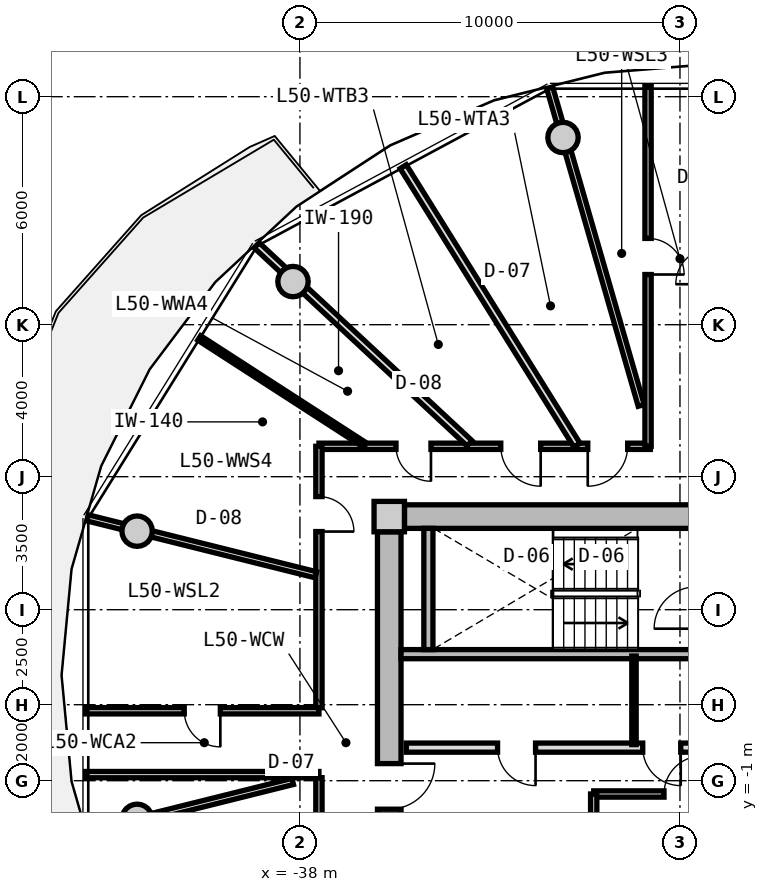
"""IFC4 building model, lengths in metres.
Left out: names, types, materials, properties, quantities, classifications, styles, units other than length and angle.
Written with IfcOpenShell. Run it as: python <this file> out.ifc"""

import sys

from ifc_helpers import new_model, si_unit, direction, frame, frame_2d, origin, origin_2d, place, context, subcontext, project, spatial, rectangle, circle, extrude, source, transform, mapped, element, fill, save


model = new_model("IFC4")
c1 = context("Model", 3, precision=1e-05, world=origin(), true_north=direction((0.0, 1.0)))
c2 = subcontext(c1, "Body", "Model", "MODEL_VIEW")
j1 = project(units=[si_unit("LENGTHUNIT", "METRE"), si_unit("PLANEANGLEUNIT", "RADIAN")], contexts=[c1])
p1 = place(None, origin())
s1 = spatial("IfcSite", under=j1, at=p1, CompositionType="ELEMENT")
p2 = place(p1, origin())
s2 = spatial("IfcBuilding", under=s1, at=p2, CompositionType="ELEMENT")
p3 = place(p2, frame((0.0, 0.0, 161.75)))
s3 = spatial("IfcBuildingStorey", under=s2, at=p3, CompositionType="ELEMENT", Elevation=161.75)
m1 = source(origin(), c2, "Body", "SweptSolid", [
    extrude(rectangle(XDim=0.8, YDim=0.8, at=origin_2d()), origin(), (0.0, 0.0, 1.0), 3.05),
])
p4 = place(p3, frame((-35.65, 5.95, 0.0), z_axis=(0.0, 0.0, 1.0), x_axis=(1.0, 0.0, 0.0)))
e1 = element("IfcColumn", 1, at=p4, inside=s3, PredefinedType="COLUMN", context=c2, shape_type="MappedRepresentation", body=[
    mapped(m1, transform((0.0, 0.0, 0.0), x_axis=(1.0, 0.0, 0.0), y_axis=(0.0, 1.0, 0.0), z_axis=(0.0, 0.0, 1.0), scale=1.0)),
])
m2 = source(origin(), c2, "Body", "SweptSolid", [
    extrude(rectangle(XDim=14.5, YDim=0.62, at=frame_2d((7.25, 0.0))), origin(), (0.0, 0.0, 1.0), 2.81),
])
p5 = place(p3, frame((-35.25, 5.95, 0.0), z_axis=(0.0, 0.0, 1.0), x_axis=(1.0, 0.0, 0.0)))
e2 = element("IfcWall", 2, at=p5, inside=s3, PredefinedType="SHEAR", context=c2, shape_type="MappedRepresentation", body=[
    mapped(m2, transform((0.0, 0.0, 0.0), x_axis=(1.0, 0.0, 0.0), y_axis=(0.0, 1.0, 0.0), z_axis=(0.0, 0.0, 1.0), scale=1.0)),
])
m3 = source(origin(), c2, "Body", "SweptSolid", [
    extrude(rectangle(XDim=11.1, YDim=0.62, at=frame_2d((5.55, 0.0))), origin(), (0.0, 0.0, 1.0), 2.81),
])
p6 = place(p3, frame((-35.65, -5.55, 0.0), z_axis=(0.0, 0.0, 1.0), x_axis=(0.0, 1.0, 0.0)))
e3 = element("IfcWall", 3, at=p6, inside=s3, PredefinedType="SHEAR", context=c2, shape_type="MappedRepresentation", body=[
    mapped(m3, transform((0.0, 0.0, 0.0), x_axis=(1.0, 0.0, 0.0), y_axis=(0.0, 1.0, 0.0), z_axis=(0.0, 0.0, 1.0), scale=1.0)),
])
p7 = place(p6, frame((3.8, 0.0, 0.0)))
e4 = element("IfcOpeningElement", 4, at=p7, cuts=e3, PredefinedType="OPENING", context=c2, shape_type="SweptSolid", body=[
    extrude(rectangle(XDim=1.2, YDim=2.15, at=frame_2d((0.6, 1.075))), frame((0.0, 0.32, 0.0), z_axis=(0.0, -1.0, 0.0), x_axis=(1.0, 0.0, 0.0)), (0.0, 0.0, 1.0), 0.64),
])
m4 = source(origin(), c2, "Body", "SweptSolid", [
    extrude(circle(Radius=0.4, at=origin_2d()), origin(), (0.0, 0.0, 1.0), 3.05),
])
for number, where, z_axis, x_axis in (
    (5, (-31.077, 15.926, 0.0), (0.0, 0.0, 1.0), (1.0, 0.0, 0.0)),
    (6, (-38.183, 12.135, 0.0), (0.0, 0.0, 1.0), (1.0, 0.0, 0.0)),
    (7, (-42.285, 5.567, 0.0), (0.0, 0.0, 1.0), (1.0, 0.0, 0.0)),
    (8, (-42.285, -2.016, 0.0), (0.0, 0.0, 1.0), (1.0, 0.0, 0.0)),
):
    element("IfcColumn", number, at=place(p3, frame(where, z_axis=z_axis, x_axis=x_axis)), inside=s3, PredefinedType="COLUMN", context=c2, shape_type="MappedRepresentation", body=[
        mapped(m4, transform((0.0, 0.0, 0.0), x_axis=(1.0, 0.0, 0.0), y_axis=(0.0, 1.0, 0.0), z_axis=(0.0, 0.0, 1.0), scale=1.0)),
    ])
m5 = source(origin(), c2, "Body", "SweptSolid", [
    extrude(rectangle(XDim=7.88, YDim=0.24, at=frame_2d((3.94, 0.0))), origin(), (0.0, 0.0, 1.0), 2.81),
])
p8 = place(p3, frame((-35.34, 2.33, 0.0), z_axis=(0.0, 0.0, 1.0), x_axis=(1.0, 0.0, 0.0)))
e9 = element("IfcWall", 9, at=p8, inside=s3, PredefinedType="PARTITIONING", context=c2, shape_type="MappedRepresentation", body=[
    mapped(m5, transform((0.0, 0.0, 0.0), x_axis=(1.0, 0.0, 0.0), y_axis=(0.0, 1.0, 0.0), z_axis=(0.0, 0.0, 1.0), scale=1.0)),
])
m6 = source(origin(), c2, "Body", "SweptSolid", [
    extrude(rectangle(XDim=3.19, YDim=0.24, at=frame_2d((1.595, 0.0))), origin(), (0.0, 0.0, 1.0), 2.81),
])
p9 = place(p3, frame((-34.62, 2.45, 0.0), z_axis=(0.0, 0.0, 1.0), x_axis=(0.0, 1.0, 0.0)))
e10 = element("IfcWall", 10, at=p9, inside=s3, PredefinedType="PARTITIONING", context=c2, shape_type="MappedRepresentation", body=[
    mapped(m6, transform((0.0, 0.0, 0.0), x_axis=(1.0, 0.0, 0.0), y_axis=(0.0, 1.0, 0.0), z_axis=(0.0, 0.0, 1.0), scale=1.0)),
])
m7 = source(origin(), c2, "Body", "SweptSolid", [
    extrude(rectangle(XDim=7.62, YDim=0.24, at=frame_2d((3.81, 0.0))), origin(), (0.0, 0.0, 1.0), 2.795),
])
p10 = place(p3, frame((-35.2, -0.13, 0.0), z_axis=(0.0, 0.0, 1.0), x_axis=(1.0, 0.0, 0.0)))
e11 = element("IfcWall", 11, at=p10, inside=s3, PredefinedType="PARTITIONING", context=c2, shape_type="MappedRepresentation", body=[
    mapped(m7, transform((0.0, 0.0, 0.0), x_axis=(1.0, 0.0, 0.0), y_axis=(0.0, 1.0, 0.0), z_axis=(0.0, 0.0, 1.0), scale=1.0)),
])
p11 = place(p10, frame((6.22, 0.0, 0.0)))
e12 = element("IfcOpeningElement", 12, at=p11, cuts=e11, PredefinedType="OPENING", context=c2, shape_type="SweptSolid", body=[
    extrude(rectangle(XDim=1.0, YDim=2.1, at=frame_2d((0.5, 1.05))), frame((0.0, 0.13, 0.0), z_axis=(0.0, -1.0, 0.0), x_axis=(1.0, 0.0, 0.0)), (0.0, 0.0, 1.0), 0.26),
])
p12 = place(p10, frame((2.4, 0.0, 0.0)))
e13 = element("IfcOpeningElement", 13, at=p12, cuts=e11, PredefinedType="OPENING", context=c2, shape_type="SweptSolid", body=[
    extrude(rectangle(XDim=1.0, YDim=2.1, at=frame_2d((0.5, 1.05))), frame((0.0, 0.13, 0.0), z_axis=(0.0, -1.0, 0.0), x_axis=(1.0, 0.0, 0.0)), (0.0, 0.0, 1.0), 0.26),
])
m8 = source(origin(), c2, "Body", "SweptSolid", [
    extrude(rectangle(XDim=2.33, YDim=0.115, at=frame_2d((1.165, 0.0))), origin(), (0.0, 0.0, 1.0), 2.795),
])
p13 = place(p3, frame((-29.21, -0.05, 0.0), z_axis=(0.0, 0.0, 1.0), x_axis=(0.0, 1.0, 0.0)))
e14 = element("IfcWall", 14, at=p13, inside=s3, PredefinedType="PARTITIONING", context=c2, shape_type="MappedRepresentation", body=[
    mapped(m8, transform((0.0, 0.0, 0.0), x_axis=(1.0, 0.0, 0.0), y_axis=(0.0, 1.0, 0.0), z_axis=(0.0, 0.0, 1.0), scale=1.0)),
])
m9 = source(origin(), c2, "Body", "SweptSolid", [
    extrude(rectangle(XDim=4.77, YDim=0.165, at=frame_2d((2.385, 0.0))), origin(), (0.0, 0.0, 1.0), 2.795),
])
p14 = place(p3, frame((-30.27, -1.35, 0.0), z_axis=(0.0, 0.0, 1.0), x_axis=(1.0, 0.0, 0.0)))
e15 = element("IfcWall", 15, at=p14, inside=s3, PredefinedType="PARTITIONING", context=c2, shape_type="MappedRepresentation", body=[
    mapped(m9, transform((0.0, 0.0, 0.0), x_axis=(1.0, 0.0, 0.0), y_axis=(0.0, 1.0, 0.0), z_axis=(0.0, 0.0, 1.0), scale=1.0)),
])
p15 = place(p14, frame((1.85, 0.0, 0.0)))
e16 = element("IfcOpeningElement", 16, at=p15, cuts=e15, PredefinedType="OPENING", context=c2, shape_type="SweptSolid", body=[
    extrude(rectangle(XDim=1.0, YDim=2.1, at=frame_2d((0.5, 1.05))), frame((0.0, 0.093, 0.0), z_axis=(0.0, -1.0, 0.0), x_axis=(1.0, 0.0, 0.0)), (0.0, 0.0, 1.0), 0.185),
])
m10 = source(origin(), c2, "Body", "SweptSolid", [
    extrude(rectangle(XDim=0.98, YDim=0.165, at=frame_2d((0.49, 0.0))), origin(), (0.0, 0.0, 1.0), 2.795),
])
p16 = place(p3, frame((-30.27, -2.33, 0.0), z_axis=(0.0, 0.0, 1.0), x_axis=(0.0, 1.0, 0.0)))
e17 = element("IfcWall", 17, at=p16, inside=s3, PredefinedType="PARTITIONING", context=c2, shape_type="MappedRepresentation", body=[
    mapped(m10, transform((0.0, 0.0, 0.0), x_axis=(1.0, 0.0, 0.0), y_axis=(0.0, 1.0, 0.0), z_axis=(0.0, 0.0, 1.0), scale=1.0)),
])
m11 = source(origin(), c2, "Body", "SweptSolid", [
    extrude(rectangle(XDim=8.719, YDim=0.165, at=frame_2d((4.36, 0.0))), origin(), (0.0, 0.0, 1.0), 2.795),
])
p17 = place(p3, frame((-37.5, 7.8, 0.0), z_axis=(0.0, 0.0, 1.0), x_axis=(1.0, 0.0, 0.0)))
e18 = element("IfcWall", 18, at=p17, inside=s3, PredefinedType="PARTITIONING", context=c2, shape_type="MappedRepresentation", body=[
    mapped(m11, transform((0.0, 0.0, 0.0), x_axis=(1.0, 0.0, 0.0), y_axis=(0.0, 1.0, 0.0), z_axis=(0.0, 0.0, 1.0), scale=1.0)),
])
p18 = place(p17, frame((7.073, 0.0, 0.0)))
e19 = element("IfcOpeningElement", 19, at=p18, cuts=e18, PredefinedType="OPENING", context=c2, shape_type="SweptSolid", body=[
    extrude(rectangle(XDim=1.05, YDim=2.15, at=frame_2d((0.525, 1.075))), frame((0.0, 0.093, 0.0), z_axis=(0.0, -1.0, 0.0), x_axis=(1.0, 0.0, 0.0)), (0.0, 0.0, 1.0), 0.185),
])
p19 = place(p17, frame((4.785, 0.0, 0.0)))
e20 = element("IfcOpeningElement", 20, at=p19, cuts=e18, PredefinedType="OPENING", context=c2, shape_type="SweptSolid", body=[
    extrude(rectangle(XDim=1.05, YDim=2.15, at=frame_2d((0.525, 1.075))), frame((0.0, 0.093, 0.0), z_axis=(0.0, -1.0, 0.0), x_axis=(1.0, 0.0, 0.0)), (0.0, 0.0, 1.0), 0.185),
])
p20 = place(p17, frame((2.028, 0.0, 0.0)))
e21 = element("IfcOpeningElement", 21, at=p20, cuts=e18, PredefinedType="OPENING", context=c2, shape_type="SweptSolid", body=[
    extrude(rectangle(XDim=0.92, YDim=2.1, at=frame_2d((0.46, 1.05))), frame((0.0, 0.093, 0.0), z_axis=(0.0, -1.0, 0.0), x_axis=(1.0, 0.0, 0.0)), (0.0, 0.0, 1.0), 0.185),
])
m12 = source(origin(), c2, "Body", "SweptSolid", [
    extrude(rectangle(XDim=6.88, YDim=0.165, at=frame_2d((3.44, 0.0))), origin(), (0.0, 0.0, 1.0), 2.795),
])
p21 = place(p3, frame((-37.5, -7.8, 0.0), z_axis=(0.0, 0.0, 1.0), x_axis=(0.0, 1.0, 0.0)))
e22 = element("IfcWall", 22, at=p21, inside=s3, PredefinedType="PARTITIONING", context=c2, shape_type="MappedRepresentation", body=[
    mapped(m12, transform((0.0, 0.0, 0.0), x_axis=(1.0, 0.0, 0.0), y_axis=(0.0, 1.0, 0.0), z_axis=(0.0, 0.0, 1.0), scale=1.0)),
])
p22 = place(p3, frame((-37.5, 0.92, 0.0), z_axis=(0.0, 0.0, 1.0), x_axis=(0.0, 1.0, 0.0)))
e23 = element("IfcWall", 23, at=p22, inside=s3, PredefinedType="PARTITIONING", context=c2, shape_type="MappedRepresentation", body=[
    mapped(m12, transform((0.0, 0.0, 0.0), x_axis=(1.0, 0.0, 0.0), y_axis=(0.0, 1.0, 0.0), z_axis=(0.0, 0.0, 1.0), scale=1.0)),
])
p23 = place(p22, frame((4.636, 0.0, 0.0)))
e24 = element("IfcOpeningElement", 24, at=p23, cuts=e23, PredefinedType="OPENING", context=c2, shape_type="SweptSolid", body=[
    extrude(rectangle(XDim=0.92, YDim=2.1, at=frame_2d((0.46, 1.05))), frame((0.0, 0.093, 0.0), z_axis=(0.0, -1.0, 0.0), x_axis=(1.0, 0.0, 0.0)), (0.0, 0.0, 1.0), 0.185),
])
m13 = source(origin(), c2, "Body", "SweptSolid", [
    extrude(rectangle(XDim=8.695, YDim=0.165, at=frame_2d((4.348, 0.0))), origin(), (0.0, 0.0, 1.0), 2.345),
])
p24 = place(p3, frame((-29.02, 8.875, 0.0), z_axis=(0.0, 0.0, 1.0), x_axis=(-0.276797231892, 0.960928349263, 0.0)))
e25 = element("IfcWall", 25, at=p24, inside=s3, PredefinedType="PARTITIONING", context=c2, shape_type="MappedRepresentation", body=[
    mapped(m13, transform((0.0, 0.0, 0.0), x_axis=(1.0, 0.0, 0.0), y_axis=(0.0, 1.0, 0.0), z_axis=(0.0, 0.0, 1.0), scale=1.0)),
])
m14 = source(origin(), c2, "Body", "SweptSolid", [
    extrude(rectangle(XDim=6.193, YDim=0.165, at=frame_2d((3.096, 0.0))), origin(), (0.0, 0.0, 1.0), 2.345),
])
p25 = place(p3, frame((-37.58, 4.419, 0.0), z_axis=(0.0, 0.0, 1.0), x_axis=(-0.970309243466, 0.241867674657, 0.0)))
e26 = element("IfcWall", 26, at=p25, inside=s3, PredefinedType="PARTITIONING", context=c2, shape_type="MappedRepresentation", body=[
    mapped(m14, transform((0.0, 0.0, 0.0), x_axis=(1.0, 0.0, 0.0), y_axis=(0.0, 1.0, 0.0), z_axis=(0.0, 0.0, 1.0), scale=1.0)),
])
m15 = source(origin(), c2, "Body", "SweptSolid", [
    extrude(rectangle(XDim=5.564, YDim=0.165, at=frame_2d((2.782, 0.0))), origin(), (0.0, 0.0, 1.0), 2.345),
])
p26 = place(p3, frame((-38.19, -1.02, 0.0), z_axis=(0.0, 0.0, 1.0), x_axis=(-0.97031260977, -0.241854169533, 0.0)))
e27 = element("IfcWall", 27, at=p26, inside=s3, PredefinedType="PARTITIONING", context=c2, shape_type="MappedRepresentation", body=[
    mapped(m15, transform((0.0, 0.0, 0.0), x_axis=(1.0, 0.0, 0.0), y_axis=(0.0, 1.0, 0.0), z_axis=(0.0, 0.0, 1.0), scale=1.0)),
])
m16 = source(origin(), c2, "Body", "SweptSolid", [
    extrude(rectangle(XDim=9.48, YDim=0.165, at=frame_2d((4.74, 0.0))), origin(), (0.0, 0.0, 1.0), 2.795),
])
p27 = place(p3, frame((-28.84, 7.8, 0.0), z_axis=(0.0, 0.0, 1.0), x_axis=(0.0, 1.0, 0.0)))
e28 = element("IfcWall", 28, at=p27, inside=s3, PredefinedType="PARTITIONING", context=c2, shape_type="MappedRepresentation", body=[
    mapped(m16, transform((0.0, 0.0, 0.0), x_axis=(1.0, 0.0, 0.0), y_axis=(0.0, 1.0, 0.0), z_axis=(0.0, 0.0, 1.0), scale=1.0)),
])
p28 = place(p27, frame((4.521, 0.0, 0.0)))
e29 = element("IfcOpeningElement", 29, at=p28, cuts=e28, PredefinedType="OPENING", context=c2, shape_type="SweptSolid", body=[
    extrude(rectangle(XDim=0.95, YDim=2.1, at=frame_2d((0.475, 1.05))), frame((0.0, 0.093, 0.0), z_axis=(0.0, -1.0, 0.0), x_axis=(1.0, 0.0, 0.0)), (0.0, 0.0, 1.0), 0.185),
])
m17 = source(origin(), c2, "Body", "SweptSolid", [
    extrude(rectangle(XDim=6.139, YDim=0.165, at=frame_2d((3.069, 0.0))), origin(), (0.0, 0.0, 1.0), 2.795),
])
p29 = place(p3, frame((-43.639, 0.84, 0.0), z_axis=(0.0, 0.0, 1.0), x_axis=(1.0, 0.0, 0.0)))
e30 = element("IfcWall", 30, at=p29, inside=s3, PredefinedType="PARTITIONING", context=c2, shape_type="MappedRepresentation", body=[
    mapped(m17, transform((0.0, 0.0, 0.0), x_axis=(1.0, 0.0, 0.0), y_axis=(0.0, 1.0, 0.0), z_axis=(0.0, 0.0, 1.0), scale=1.0)),
])
p30 = place(p29, frame((2.594, 0.0, 0.0)))
e31 = element("IfcOpeningElement", 31, at=p30, cuts=e30, PredefinedType="OPENING", context=c2, shape_type="SweptSolid", body=[
    extrude(rectangle(XDim=0.95, YDim=2.1, at=frame_2d((0.475, 1.05))), frame((0.0, 0.093, 0.0), z_axis=(0.0, -1.0, 0.0), x_axis=(1.0, 0.0, 0.0)), (0.0, 0.0, 1.0), 0.185),
])
p31 = place(p3, frame((-37.5, -0.84, 0.0), z_axis=(0.0, 0.0, 1.0), x_axis=(-1.0, 0.0, 0.0)))
e32 = element("IfcWall", 32, at=p31, inside=s3, PredefinedType="PARTITIONING", context=c2, shape_type="MappedRepresentation", body=[
    mapped(m17, transform((0.0, 0.0, 0.0), x_axis=(1.0, 0.0, 0.0), y_axis=(0.0, 1.0, 0.0), z_axis=(0.0, 0.0, 1.0), scale=1.0)),
])
m18 = source(origin(), c2, "Body", "SweptSolid", [
    extrude(rectangle(XDim=7.648, YDim=0.19, at=frame_2d((3.824, 0.0))), origin(), (0.0, 0.0, 1.0), 2.345),
])
p32 = place(p3, frame((-33.538, 7.88, 0.0), z_axis=(0.0, 0.0, 1.0), x_axis=(-0.732167856666, 0.681124239522, 0.0)))
e33 = element("IfcWall", 33, at=p32, inside=s3, PredefinedType="PARTITIONING", context=c2, shape_type="MappedRepresentation", body=[
    mapped(m18, transform((0.0, 0.0, 0.0), x_axis=(1.0, 0.0, 0.0), y_axis=(0.0, 1.0, 0.0), z_axis=(0.0, 0.0, 1.0), scale=1.0)),
])
m19 = source(origin(), c2, "Body", "SweptSolid", [
    extrude(rectangle(XDim=8.638, YDim=0.19, at=frame_2d((4.319, 0.0))), origin(), (0.0, 0.0, 1.0), 2.795),
])
p33 = place(p3, frame((-30.711, 7.83, 0.0), z_axis=(0.0, 0.0, 1.0), x_axis=(-0.529150133108, 0.848528217935, 0.0)))
e34 = element("IfcWall", 34, at=p33, inside=s3, PredefinedType="PARTITIONING", context=c2, shape_type="MappedRepresentation", body=[
    mapped(m19, transform((0.0, 0.0, 0.0), x_axis=(1.0, 0.0, 0.0), y_axis=(0.0, 1.0, 0.0), z_axis=(0.0, 0.0, 1.0), scale=1.0)),
])
m20 = source(origin(), c2, "Body", "SweptSolid", [
    extrude(rectangle(XDim=5.197, YDim=0.14, at=frame_2d((2.598, 0.0))), origin(), (0.0, 0.0, 1.0), 2.795),
])
p34 = place(p3, frame((-36.286, 7.83, 0.0), z_axis=(0.0, 0.0, 1.0), x_axis=(-0.839929187515, 0.542696010637, 0.0)))
e35 = element("IfcWall", 35, at=p34, inside=s3, PredefinedType="PARTITIONING", context=c2, shape_type="MappedRepresentation", body=[
    mapped(m20, transform((0.0, 0.0, 0.0), x_axis=(1.0, 0.0, 0.0), y_axis=(0.0, 1.0, 0.0), z_axis=(0.0, 0.0, 1.0), scale=1.0)),
])
m21 = source(origin(), c2, "Body", "SweptSolid", [
    extrude(rectangle(XDim=1.2, YDim=2.15, at=frame_2d((0.6, 1.075))), frame((0.0, 0.025, 0.0), z_axis=(0.0, -1.0, 0.0), x_axis=(1.0, 0.0, 0.0)), (0.0, 0.0, 1.0), 0.05),
])
p35 = place(p7, frame((1.2, 0.0, 0.0), z_axis=(0.0, 0.0, 1.0), x_axis=(-1.0, 0.0, 0.0)))
e36 = element("IfcDoor", 36, at=p35, inside=s3, OperationType="SINGLE_SWING_LEFT", PredefinedType="DOOR", context=c2, shape_type="MappedRepresentation", body=[
    mapped(m21, transform((0.0, 0.0, 0.0), x_axis=(1.0, 0.0, 0.0), y_axis=(0.0, 1.0, 0.0), z_axis=(0.0, 0.0, 1.0), scale=1.0)),
])
fill(e4, e36)
m22 = source(origin(), c2, "Body", "SweptSolid", [
    extrude(rectangle(XDim=1.0, YDim=2.1, at=frame_2d((0.5, 1.05))), frame((0.0, 0.025, 0.0), z_axis=(0.0, -1.0, 0.0), x_axis=(1.0, 0.0, 0.0)), (0.0, 0.0, 1.0), 0.05),
])
p36 = place(p11, frame((1.0, 0.0, 0.0), z_axis=(0.0, 0.0, 1.0), x_axis=(-1.0, 0.0, 0.0)))
e37 = element("IfcDoor", 37, at=p36, inside=s3, OperationType="SINGLE_SWING_LEFT", PredefinedType="DOOR", context=c2, shape_type="MappedRepresentation", body=[
    mapped(m22, transform((0.0, 0.0, 0.0), x_axis=(1.0, 0.0, 0.0), y_axis=(0.0, 1.0, 0.0), z_axis=(0.0, 0.0, 1.0), scale=1.0)),
])
fill(e12, e37)
p37 = place(p12, frame((1.0, 0.0, 0.0), z_axis=(0.0, 0.0, 1.0), x_axis=(-1.0, 0.0, 0.0)))
e38 = element("IfcDoor", 38, at=p37, inside=s3, OperationType="SINGLE_SWING_LEFT", PredefinedType="DOOR", context=c2, shape_type="MappedRepresentation", body=[
    mapped(m22, transform((0.0, 0.0, 0.0), x_axis=(1.0, 0.0, 0.0), y_axis=(0.0, 1.0, 0.0), z_axis=(0.0, 0.0, 1.0), scale=1.0)),
])
fill(e13, e38)
p38 = place(p15, origin())
e39 = element("IfcDoor", 39, at=p38, inside=s3, OperationType="SINGLE_SWING_RIGHT", PredefinedType="DOOR", context=c2, shape_type="MappedRepresentation", body=[
    mapped(m22, transform((0.0, 0.0, 0.0), x_axis=(1.0, 0.0, 0.0), y_axis=(0.0, 1.0, 0.0), z_axis=(0.0, 0.0, 1.0), scale=1.0)),
])
fill(e16, e39)
m23 = source(origin(), c2, "Body", "SweptSolid", [
    extrude(rectangle(XDim=0.95, YDim=2.1, at=frame_2d((0.475, 1.05))), frame((0.0, 0.025, 0.0), z_axis=(0.0, -1.0, 0.0), x_axis=(1.0, 0.0, 0.0)), (0.0, 0.0, 1.0), 0.05),
])
p39 = place(p30, frame((0.95, 0.0, 0.0), z_axis=(0.0, 0.0, 1.0), x_axis=(-1.0, 0.0, 0.0)))
e40 = element("IfcDoor", 40, at=p39, inside=s3, OperationType="SINGLE_SWING_LEFT", PredefinedType="DOOR", context=c2, shape_type="MappedRepresentation", body=[
    mapped(m23, transform((0.0, 0.0, 0.0), x_axis=(1.0, 0.0, 0.0), y_axis=(0.0, 1.0, 0.0), z_axis=(0.0, 0.0, 1.0), scale=1.0)),
])
fill(e31, e40)
p40 = place(p28, frame((0.95, 0.0, 0.0), z_axis=(0.0, 0.0, 1.0), x_axis=(-1.0, 0.0, 0.0)))
e41 = element("IfcDoor", 41, at=p40, inside=s3, OperationType="SINGLE_SWING_RIGHT", PredefinedType="DOOR", context=c2, shape_type="MappedRepresentation", body=[
    mapped(m23, transform((0.0, 0.0, 0.0), x_axis=(1.0, 0.0, 0.0), y_axis=(0.0, 1.0, 0.0), z_axis=(0.0, 0.0, 1.0), scale=1.0)),
])
fill(e29, e41)
m24 = source(origin(), c2, "Body", "SweptSolid", [
    extrude(rectangle(XDim=1.05, YDim=2.15, at=frame_2d((0.525, 1.075))), frame((0.0, 0.025, 0.0), z_axis=(0.0, -1.0, 0.0), x_axis=(1.0, 0.0, 0.0)), (0.0, 0.0, 1.0), 0.05),
])
p41 = place(p18, frame((1.05, 0.0, 0.0), z_axis=(0.0, 0.0, 1.0), x_axis=(-1.0, 0.0, 0.0)))
e42 = element("IfcDoor", 42, at=p41, inside=s3, OperationType="SINGLE_SWING_RIGHT", PredefinedType="DOOR", context=c2, shape_type="MappedRepresentation", body=[
    mapped(m24, transform((0.0, 0.0, 0.0), x_axis=(1.0, 0.0, 0.0), y_axis=(0.0, 1.0, 0.0), z_axis=(0.0, 0.0, 1.0), scale=1.0)),
])
fill(e19, e42)
p42 = place(p19, frame((1.05, 0.0, 0.0), z_axis=(0.0, 0.0, 1.0), x_axis=(-1.0, 0.0, 0.0)))
e43 = element("IfcDoor", 43, at=p42, inside=s3, OperationType="SINGLE_SWING_LEFT", PredefinedType="DOOR", context=c2, shape_type="MappedRepresentation", body=[
    mapped(m24, transform((0.0, 0.0, 0.0), x_axis=(1.0, 0.0, 0.0), y_axis=(0.0, 1.0, 0.0), z_axis=(0.0, 0.0, 1.0), scale=1.0)),
])
fill(e20, e43)
m25 = source(origin(), c2, "Body", "SweptSolid", [
    extrude(rectangle(XDim=0.92, YDim=2.1, at=frame_2d((0.46, 1.05))), frame((0.0, 0.025, 0.0), z_axis=(0.0, -1.0, 0.0), x_axis=(1.0, 0.0, 0.0)), (0.0, 0.0, 1.0), 0.05),
])
p43 = place(p20, frame((0.92, 0.0, 0.0), z_axis=(0.0, 0.0, 1.0), x_axis=(-1.0, 0.0, 0.0)))
e44 = element("IfcDoor", 44, at=p43, inside=s3, OperationType="SINGLE_SWING_LEFT", PredefinedType="DOOR", context=c2, shape_type="MappedRepresentation", body=[
    mapped(m25, transform((0.0, 0.0, 0.0), x_axis=(1.0, 0.0, 0.0), y_axis=(0.0, 1.0, 0.0), z_axis=(0.0, 0.0, 1.0), scale=1.0)),
])
fill(e21, e44)
p44 = place(p23, frame((0.92, 0.0, 0.0), z_axis=(0.0, 0.0, 1.0), x_axis=(-1.0, 0.0, 0.0)))
e45 = element("IfcDoor", 45, at=p44, inside=s3, OperationType="SINGLE_SWING_RIGHT", PredefinedType="DOOR", context=c2, shape_type="MappedRepresentation", body=[
    mapped(m25, transform((0.0, 0.0, 0.0), x_axis=(1.0, 0.0, 0.0), y_axis=(0.0, 1.0, 0.0), z_axis=(0.0, 0.0, 1.0), scale=1.0)),
])
fill(e24, e45)
save(model, sys.argv[1])
